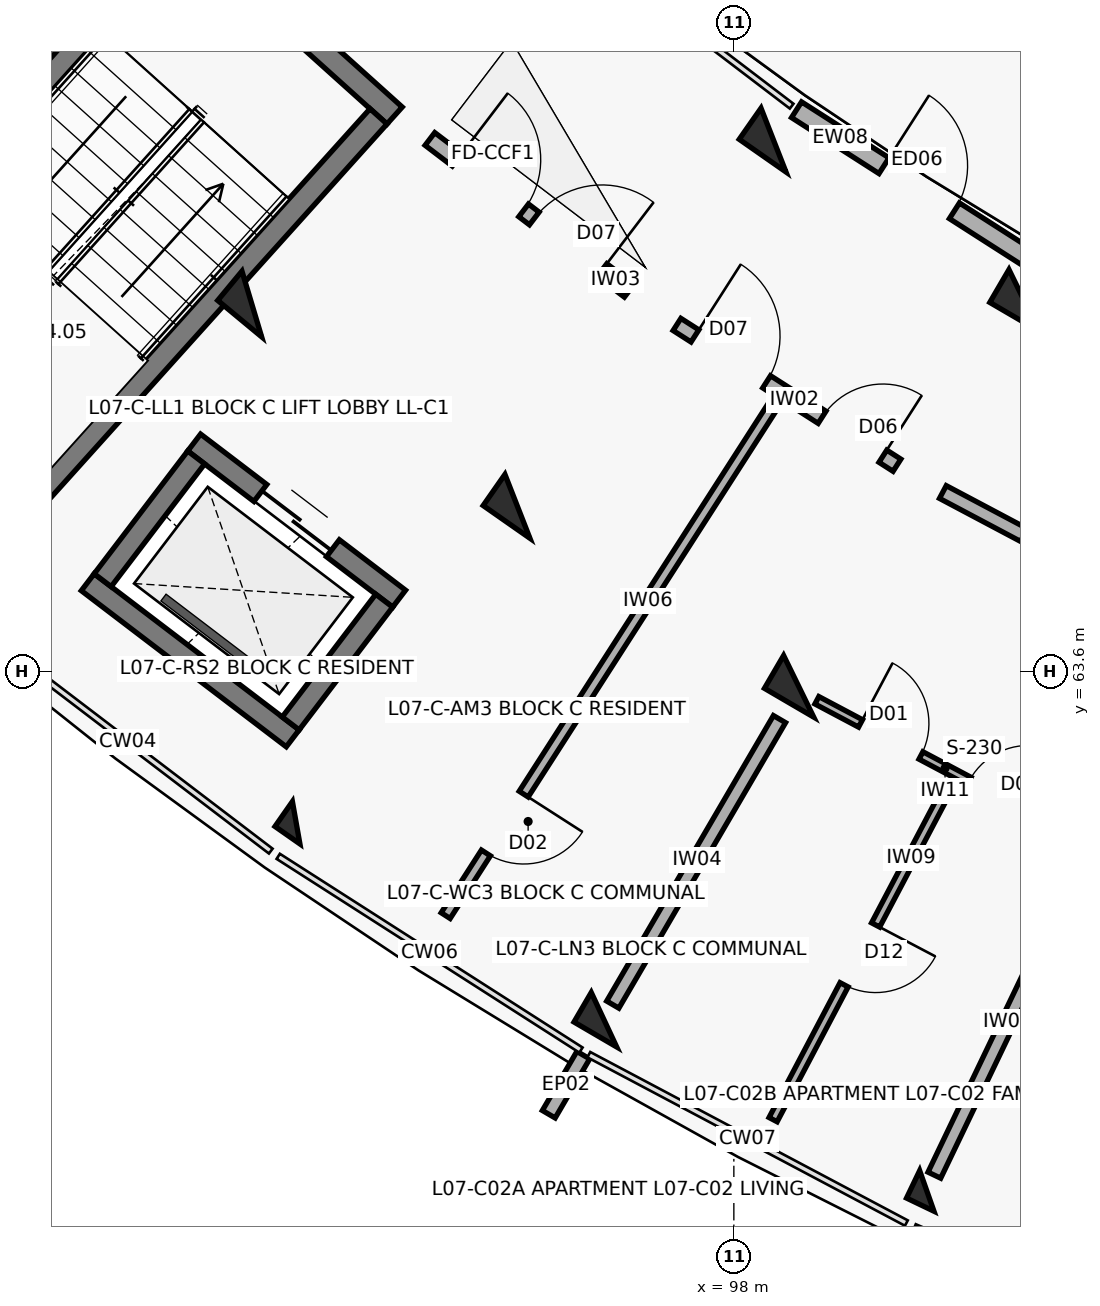
"""IFC4 building model, lengths in metres.
Left out: names, types, materials, properties, quantities, classifications, styles, units other than length and angle.
Written with IfcOpenShell. Run it as: python <this file> out.ifc"""

import sys

from ifc_helpers import new_model, si_unit, direction, frame, frame_2d, origin, origin_2d, place, context, subcontext, project, spatial, rectangle, extrude, element, fill, save


model = new_model("IFC4")
c1 = context("Model", 3, precision=1e-05, world=origin(), true_north=direction((0.0, 1.0)))
c2 = subcontext(c1, "Body", "Model", "MODEL_VIEW")
j1 = project(units=[si_unit("LENGTHUNIT", "METRE"), si_unit("PLANEANGLEUNIT", "RADIAN")], contexts=[c1])
p1 = place(None, origin())
s1 = spatial("IfcSite", under=j1, at=p1, CompositionType="ELEMENT")
p2 = place(p1, origin())
s2 = spatial("IfcBuilding", under=s1, at=p2, CompositionType="ELEMENT")
p3 = place(p2, frame((0.0, 0.0, 23.6)))
s3 = spatial("IfcBuildingStorey", under=s2, at=p3, CompositionType="ELEMENT", Elevation=23.6)
for number, where, z_axis, x_axis in (
    (1, (91.658, 68.43, 0.0), (0.0, 0.0, 1.0), (-0.638, -0.77, 0.0)),
    (2, (98.522, 70.587, 0.0), (0.0, 0.0, 1.0), (-0.573, -0.82, 0.0)),
    (3, (95.152, 65.768, 0.0), (0.0, 0.0, 1.0), (-0.573, -0.82, 0.0)),
):
    element("IfcColumn", number, at=place(p3, frame(where, z_axis=z_axis, x_axis=x_axis)), inside=s3, PredefinedType="COLUMN", context=c2, shape_type="SweptSolid", body=[
        extrude(rectangle(XDim=0.5, YDim=0.75, at=origin_2d()), origin(), (0.0, 0.0, 1.0), 3.1),
    ])
p4 = place(p3, frame((92.241, 61.605, 0.0), z_axis=(0.0, 0.0, 1.0), x_axis=(-0.573004420611, -0.819552276527, 0.0)))
e4 = element("IfcColumn", 4, at=p4, inside=s3, PredefinedType="COLUMN", context=c2, shape_type="SweptSolid", body=[
    extrude(rectangle(XDim=0.4, YDim=0.4, at=origin_2d()), origin(), (0.0, 0.0, 1.0), 3.1),
])
for number, where, z_axis, x_axis in (
    (5, (101.817, 68.478, 0.0), (0.0, 0.0, 1.0), (-0.504, -0.864, 0.0)),
    (6, (98.853, 63.4, 0.0), (0.0, 0.0, 1.0), (-0.504, -0.864, 0.0)),
):
    element("IfcColumn", number, at=place(p3, frame(where, z_axis=z_axis, x_axis=x_axis)), inside=s3, PredefinedType="COLUMN", context=c2, shape_type="SweptSolid", body=[
        extrude(rectangle(XDim=0.5, YDim=0.75, at=origin_2d()), origin(), (0.0, 0.0, 1.0), 3.1),
    ])
p5 = place(p3, frame((96.291, 59.013, 0.0), z_axis=(0.0, 0.0, 1.0), x_axis=(-0.504226211181, -0.863571611366, 0.0)))
e7 = element("IfcColumn", 7, at=p5, inside=s3, PredefinedType="COLUMN", context=c2, shape_type="SweptSolid", body=[
    extrude(rectangle(XDim=0.45, YDim=0.65, at=origin_2d()), origin(), (0.0, 0.0, 1.0), 3.1),
])
p6 = place(p3, frame((100.539, 56.76, 0.0), z_axis=(0.0, 0.0, 1.0), x_axis=(-0.432085748802, -0.901832526405, 0.0)))
e8 = element("IfcColumn", 8, at=p6, inside=s3, PredefinedType="COLUMN", context=c2, shape_type="SweptSolid", body=[
    extrude(rectangle(XDim=0.4, YDim=0.4, at=origin_2d()), origin(), (0.0, 0.0, 1.0), 3.1),
])
p7 = place(p3, frame((98.825, 70.986, 0.0), z_axis=(0.0, 0.0, 1.0), x_axis=(0.84225520265, -0.539079004979, 0.0)))
e9 = element("IfcWall", 9, at=p7, inside=s3, PredefinedType="SOLIDWALL", context=c2, shape_type="SweptSolid", body=[
    extrude(rectangle(XDim=3.832, YDim=0.245, at=frame_2d((1.916, 0.0))), origin(), (0.0, 0.0, 1.0), 2.25),
])
p8 = place(p7, frame((1.366, 0.0, 0.0)))
e10 = element("IfcOpeningElement", 10, at=p8, cuts=e9, PredefinedType="OPENING", context=c2, shape_type="SweptSolid", body=[
    extrude(rectangle(XDim=1.1, YDim=2.15, at=frame_2d((0.55, 1.075))), frame((0.0, 0.133, 0.0), z_axis=(0.0, -1.0, 0.0), x_axis=(1.0, 0.0, 0.0)), (0.0, 0.0, 1.0), 0.265),
])
p9 = place(p3, frame((96.019, 58.547, 0.0), z_axis=(0.0, 0.0, 1.0), x_axis=(-0.504005947934, -0.863700182035, 0.0)))
e11 = element("IfcWall", 11, at=p9, inside=s3, PredefinedType="PARAPET", context=c2, shape_type="SweptSolid", body=[
    extrude(rectangle(XDim=0.9, YDim=0.195, at=frame_2d((0.45, 0.0))), origin(), (0.0, 0.0, 1.0), 2.25),
])
p10 = place(p3, frame((99.001, 74.446, 0.0), z_axis=(0.0, 0.0, 1.0), x_axis=(0.853096916088, -0.521752481317, 0.0)))
e12 = element("IfcWall", 12, at=p10, inside=s3, PredefinedType="PARAPET", context=c2, shape_type="SweptSolid", body=[
    extrude(rectangle(XDim=9.075, YDim=0.18, at=frame_2d((4.538, 0.0))), origin(), (0.0, 0.0, 1.0), 0.25),
])
p11 = place(p3, frame((90.66, 73.499, 0.0), z_axis=(0.0, 0.0, 1.0), x_axis=(0.743375696158, -0.668874109501, 0.0)))
e13 = element("IfcWall", 13, at=p11, inside=s3, PredefinedType="SHEAR", context=c2, shape_type="SweptSolid", body=[
    extrude(rectangle(XDim=3.87, YDim=0.3, at=frame_2d((1.935, 0.0))), origin(), (0.0, 0.0, 1.0), 3.1),
])
p12 = place(p11, frame((1.435, 0.0, 0.0)))
e14 = element("IfcOpeningElement", 14, at=p12, cuts=e13, PredefinedType="OPENING", context=c2, shape_type="SweptSolid", body=[
    extrude(rectangle(XDim=1.0, YDim=2.15, at=frame_2d((0.5, 1.075))), frame((0.0, 0.16, 0.0), z_axis=(0.0, -1.0, 0.0), x_axis=(1.0, 0.0, 0.0)), (0.0, 0.0, 1.0), 0.32),
])
p13 = place(p3, frame((90.671, 73.287, 0.0), z_axis=(0.0, 0.0, 1.0), x_axis=(-0.668885797871, -0.743365179038, 0.0)))
e15 = element("IfcWall", 15, at=p13, inside=s3, PredefinedType="SHEAR", context=c2, shape_type="SweptSolid", body=[
    extrude(rectangle(XDim=7.69, YDim=0.3, at=frame_2d((3.845, 0.0))), origin(), (0.0, 0.0, 1.0), 3.1),
])
p14 = place(p3, frame((93.325, 70.899, 0.0), z_axis=(0.0, 0.0, 1.0), x_axis=(-0.668868253964, -0.743380964808, 0.0)))
e16 = element("IfcWall", 16, at=p14, inside=s3, PredefinedType="SHEAR", context=c2, shape_type="SweptSolid", body=[
    extrude(rectangle(XDim=7.69, YDim=0.3, at=frame_2d((3.845, 0.0))), origin(), (0.0, 0.0, 1.0), 3.1),
])
p15 = place(p3, frame((90.899, 66.607, 0.0), z_axis=(0.0, 0.0, 1.0), x_axis=(0.795439986025, -0.606032365994, 0.0)))
e17 = element("IfcWall", 17, at=p15, inside=s3, PredefinedType="SHEAR", context=c2, shape_type="SweptSolid", body=[
    extrude(rectangle(XDim=3.39, YDim=0.28, at=frame_2d((1.695, 0.0))), origin(), (0.0, 0.0, 1.0), 3.1),
])
p16 = place(p15, frame((1.095, 0.0, 0.0)))
e18 = element("IfcOpeningElement", 18, at=p16, cuts=e17, PredefinedType="OPENING", context=c2, shape_type="SweptSolid", body=[
    extrude(rectangle(XDim=1.2, YDim=2.15, at=frame_2d((0.6, 1.075))), frame((0.0, 0.15, 0.0), z_axis=(0.0, -1.0, 0.0), x_axis=(1.0, 0.0, 0.0)), (0.0, 0.0, 1.0), 0.3),
])
p17 = place(p3, frame((89.5, 64.77, 0.0), z_axis=(0.0, 0.0, 1.0), x_axis=(0.795474703455, -0.605986795371, 0.0)))
e19 = element("IfcWall", 19, at=p17, inside=s3, PredefinedType="SHEAR", context=c2, shape_type="SweptSolid", body=[
    extrude(rectangle(XDim=3.39, YDim=0.28, at=frame_2d((1.695, 0.0))), origin(), (0.0, 0.0, 1.0), 3.1),
])
p18 = place(p3, frame((90.926, 66.411, 0.0), z_axis=(0.0, 0.0, 1.0), x_axis=(-0.605948992168, -0.795503500238, 0.0)))
e20 = element("IfcWall", 20, at=p18, inside=s3, PredefinedType="SHEAR", context=c2, shape_type="SweptSolid", body=[
    extrude(rectangle(XDim=2.03, YDim=0.28, at=frame_2d((1.015, 0.0))), origin(), (0.0, 0.0, 1.0), 3.1),
])
p19 = place(p3, frame((93.4, 64.526, 0.0), z_axis=(0.0, 0.0, 1.0), x_axis=(-0.605891019062, -0.795547656033, 0.0)))
e21 = element("IfcWall", 21, at=p19, inside=s3, PredefinedType="SHEAR", context=c2, shape_type="SweptSolid", body=[
    extrude(rectangle(XDim=2.03, YDim=0.28, at=frame_2d((1.015, 0.0))), origin(), (0.0, 0.0, 1.0), 3.1),
])
p20 = place(p3, frame((94.001, 70.602, 0.0), z_axis=(0.0, 0.0, 1.0), x_axis=(0.795498026433, -0.605956178235, 0.0)))
e22 = element("IfcWall", 22, at=p20, inside=s3, PredefinedType="SOLIDWALL", context=c2, shape_type="SweptSolid", body=[
    extrude(rectangle(XDim=3.296, YDim=0.21, at=frame_2d((1.648, 0.0))), origin(), (0.0, 0.0, 1.0), 2.08),
])
p21 = place(p20, frame((0.45, 0.0, 0.0)))
e23 = element("IfcOpeningElement", 23, at=p21, cuts=e22, PredefinedType="OPENING", context=c2, shape_type="SweptSolid", body=[
    extrude(rectangle(XDim=1.1, YDim=2.15, at=frame_2d((0.55, 1.075))), frame((0.0, 0.115, 0.0), z_axis=(0.0, -1.0, 0.0), x_axis=(1.0, 0.0, 0.0)), (0.0, 0.0, 1.0), 0.23),
])
p22 = place(p20, frame((1.726, 0.0, 0.0)))
e24 = element("IfcOpeningElement", 24, at=p22, cuts=e22, PredefinedType="OPENING", context=c2, shape_type="SweptSolid", body=[
    extrude(rectangle(XDim=1.12, YDim=2.15, at=frame_2d((0.56, 1.075))), frame((0.0, 0.115, 0.0), z_axis=(0.0, -1.0, 0.0), x_axis=(1.0, 0.0, 0.0)), (0.0, 0.0, 1.0), 0.23),
])
p23 = place(p3, frame((97.252, 68.161, 0.0), z_axis=(0.0, 0.0, 1.0), x_axis=(0.842289466461, -0.53902546757, 0.0)))
e25 = element("IfcWall", 25, at=p23, inside=s3, PredefinedType="SOLIDWALL", context=c2, shape_type="SweptSolid", body=[
    extrude(rectangle(XDim=3.436, YDim=0.19, at=frame_2d((1.718, 0.0))), origin(), (0.0, 0.0, 1.0), 2.08),
])
p24 = place(p23, frame((0.28, 0.0, 0.0)))
e26 = element("IfcOpeningElement", 26, at=p24, cuts=e25, PredefinedType="OPENING", context=c2, shape_type="SweptSolid", body=[
    extrude(rectangle(XDim=1.12, YDim=2.15, at=frame_2d((0.56, 1.075))), frame((0.0, 0.105, 0.0), z_axis=(0.0, -1.0, 0.0), x_axis=(1.0, 0.0, 0.0)), (0.0, 0.0, 1.0), 0.21),
])
p25 = place(p23, frame((2.266, 0.0, 0.0)))
e27 = element("IfcOpeningElement", 27, at=p25, cuts=e25, PredefinedType="OPENING", context=c2, shape_type="SweptSolid", body=[
    extrude(rectangle(XDim=0.95, YDim=2.1, at=frame_2d((0.475, 1.05))), frame((0.0, 0.105, 0.0), z_axis=(0.0, -1.0, 0.0), x_axis=(1.0, 0.0, 0.0)), (0.0, 0.0, 1.0), 0.21),
])
p26 = place(p3, frame((98.504, 67.072, 0.0), z_axis=(0.0, 0.0, 1.0), x_axis=(-0.540338452216, -0.841447774408, 0.0)))
e28 = element("IfcWall", 28, at=p26, inside=s3, PredefinedType="PARTITIONING", context=c2, shape_type="SweptSolid", body=[
    extrude(rectangle(XDim=7.95, YDim=0.14, at=frame_2d((3.975, 0.0))), origin(), (0.0, 0.0, 1.0), 2.08),
])
p27 = place(p26, frame((6.05, 0.0, 0.0)))
e29 = element("IfcOpeningElement", 29, at=p27, cuts=e28, PredefinedType="OPENING", context=c2, shape_type="SweptSolid", body=[
    extrude(rectangle(XDim=0.92, YDim=2.1, at=frame_2d((0.46, 1.05))), frame((0.0, 0.08, 0.0), z_axis=(0.0, -1.0, 0.0), x_axis=(1.0, 0.0, 0.0)), (0.0, 0.0, 1.0), 0.16),
])
p28 = place(p3, frame((100.75, 65.956, 0.0), z_axis=(0.0, 0.0, 1.0), x_axis=(0.883440266101, -0.468543803963, 0.0)))
e30 = element("IfcWall", 30, at=p28, inside=s3, PredefinedType="SOLIDWALL", context=c2, shape_type="SweptSolid", body=[
    extrude(rectangle(XDim=3.436, YDim=0.19, at=frame_2d((1.718, 0.0))), origin(), (0.0, 0.0, 1.0), 2.08),
])
p29 = place(p28, frame((1.208, 0.0, 0.0)))
e31 = element("IfcOpeningElement", 31, at=p29, cuts=e30, PredefinedType="OPENING", context=c2, shape_type="SweptSolid", body=[
    extrude(rectangle(XDim=1.02, YDim=2.15, at=frame_2d((0.51, 1.075))), frame((0.0, 0.105, 0.0), z_axis=(0.0, -1.0, 0.0), x_axis=(1.0, 0.0, 0.0)), (0.0, 0.0, 1.0), 0.21),
])
p30 = place(p3, frame((99.093, 63.216, 0.0), z_axis=(0.0, 0.0, 1.0), x_axis=(0.883432667361, -0.468558131121, 0.0)))
e32 = element("IfcWall", 32, at=p30, inside=s3, PredefinedType="PARTITIONING", context=c2, shape_type="SweptSolid", body=[
    extrude(rectangle(XDim=3.797, YDim=0.11, at=frame_2d((1.899, 0.0))), origin(), (0.0, 0.0, 1.0), 2.08),
])
p31 = place(p30, frame((0.65, 0.0, 0.0)))
e33 = element("IfcOpeningElement", 33, at=p31, cuts=e32, PredefinedType="OPENING", context=c2, shape_type="SweptSolid", body=[
    extrude(rectangle(XDim=0.9, YDim=2.1, at=frame_2d((0.45, 1.05))), frame((0.0, 0.065, 0.0), z_axis=(0.0, -1.0, 0.0), x_axis=(1.0, 0.0, 0.0)), (0.0, 0.0, 1.0), 0.13),
])
p32 = place(p30, frame((2.267, 0.0, 0.0)))
e34 = element("IfcOpeningElement", 34, at=p32, cuts=e32, PredefinedType="OPENING", context=c2, shape_type="SweptSolid", body=[
    extrude(rectangle(XDim=0.88, YDim=2.1, at=frame_2d((0.44, 1.05))), frame((0.0, 0.065, 0.0), z_axis=(0.0, -1.0, 0.0), x_axis=(1.0, 0.0, 0.0)), (0.0, 0.0, 1.0), 0.13),
])
p33 = place(p3, frame((100.799, 62.034, 0.0), z_axis=(0.0, 0.0, 1.0), x_axis=(-0.465869641373, -0.884853364828, 0.0)))
e35 = element("IfcWall", 35, at=p33, inside=s3, PredefinedType="PARTITIONING", context=c2, shape_type="SweptSolid", body=[
    extrude(rectangle(XDim=4.9, YDim=0.12, at=frame_2d((2.45, 0.0))), origin(), (0.0, 0.0, 1.0), 2.08),
])
p34 = place(p33, frame((2.005, 0.0, 0.0)))
e36 = element("IfcOpeningElement", 36, at=p34, cuts=e35, PredefinedType="OPENING", context=c2, shape_type="SweptSolid", body=[
    extrude(rectangle(XDim=0.89, YDim=2.1, at=frame_2d((0.445, 1.05))), frame((0.0, 0.07, 0.0), z_axis=(0.0, -1.0, 0.0), x_axis=(1.0, 0.0, 0.0)), (0.0, 0.0, 1.0), 0.14),
])
p35 = place(p3, frame((98.601, 62.968, 0.0), z_axis=(0.0, 0.0, 1.0), x_axis=(-0.504216452091, -0.863577309475, 0.0)))
e37 = element("IfcWall", 37, at=p35, inside=s3, PredefinedType="SOLIDWALL", context=c2, shape_type="SweptSolid", body=[
    extrude(rectangle(XDim=4.35, YDim=0.185, at=frame_2d((2.175, 0.0))), origin(), (0.0, 0.0, 1.0), 2.08),
])
p36 = place(p3, frame((102.518, 60.89, 0.0), z_axis=(0.0, 0.0, 1.0), x_axis=(-0.432108769108, -0.901821496561, 0.0)))
e38 = element("IfcWall", 38, at=p36, inside=s3, PredefinedType="SOLIDWALL", context=c2, shape_type="SweptSolid", body=[
    extrude(rectangle(XDim=4.35, YDim=0.185, at=frame_2d((2.175, 0.0))), origin(), (0.0, 0.0, 1.0), 2.08),
])
p37 = place(p8, origin())
e39 = element("IfcDoor", 39, at=p37, inside=s3, OperationType="SINGLE_SWING_LEFT", PredefinedType="DOOR", context=c2, shape_type="SweptSolid", body=[
    extrude(rectangle(XDim=1.1, YDim=2.15, at=frame_2d((0.55, 1.075))), frame((0.0, 0.025, 0.0), z_axis=(0.0, -1.0, 0.0), x_axis=(1.0, 0.0, 0.0)), (0.0, 0.0, 1.0), 0.05),
])
fill(e10, e39)
p38 = place(p16, origin())
e40 = element("IfcDoor", 40, at=p38, inside=s3, OperationType="DOUBLE_DOOR_SLIDING", PredefinedType="DOOR", context=c2, shape_type="SweptSolid", body=[
    extrude(rectangle(XDim=1.2, YDim=2.15, at=frame_2d((0.6, 1.075))), frame((0.0, 0.025, 0.0), z_axis=(0.0, -1.0, 0.0), x_axis=(1.0, 0.0, 0.0)), (0.0, 0.0, 1.0), 0.05),
])
fill(e18, e40)
p39 = place(p21, origin())
e41 = element("IfcDoor", 41, at=p39, inside=s3, OperationType="SINGLE_SWING_LEFT", PredefinedType="DOOR", context=c2, shape_type="SweptSolid", body=[
    extrude(rectangle(XDim=1.1, YDim=2.15, at=frame_2d((0.55, 1.075))), frame((0.0, 0.025, 0.0), z_axis=(0.0, -1.0, 0.0), x_axis=(1.0, 0.0, 0.0)), (0.0, 0.0, 1.0), 0.05),
])
fill(e23, e41)
p40 = place(p22, origin())
e42 = element("IfcDoor", 42, at=p40, inside=s3, OperationType="SINGLE_SWING_RIGHT", PredefinedType="DOOR", context=c2, shape_type="SweptSolid", body=[
    extrude(rectangle(XDim=1.12, YDim=2.15, at=frame_2d((0.56, 1.075))), frame((0.0, 0.025, 0.0), z_axis=(0.0, -1.0, 0.0), x_axis=(1.0, 0.0, 0.0)), (0.0, 0.0, 1.0), 0.05),
])
fill(e24, e42)
p41 = place(p24, origin())
e43 = element("IfcDoor", 43, at=p41, inside=s3, OperationType="SINGLE_SWING_LEFT", PredefinedType="DOOR", context=c2, shape_type="SweptSolid", body=[
    extrude(rectangle(XDim=1.12, YDim=2.15, at=frame_2d((0.56, 1.075))), frame((0.0, 0.025, 0.0), z_axis=(0.0, -1.0, 0.0), x_axis=(1.0, 0.0, 0.0)), (0.0, 0.0, 1.0), 0.05),
])
fill(e26, e43)
p42 = place(p25, origin())
e44 = element("IfcDoor", 44, at=p42, inside=s3, OperationType="SINGLE_SWING_RIGHT", PredefinedType="DOOR", context=c2, shape_type="SweptSolid", body=[
    extrude(rectangle(XDim=0.95, YDim=2.1, at=frame_2d((0.475, 1.05))), frame((0.0, 0.025, 0.0), z_axis=(0.0, -1.0, 0.0), x_axis=(1.0, 0.0, 0.0)), (0.0, 0.0, 1.0), 0.05),
])
fill(e27, e44)
p43 = place(p27, origin())
e45 = element("IfcDoor", 45, at=p43, inside=s3, OperationType="SINGLE_SWING_LEFT", PredefinedType="DOOR", context=c2, shape_type="SweptSolid", body=[
    extrude(rectangle(XDim=0.92, YDim=2.1, at=frame_2d((0.46, 1.05))), frame((0.0, 0.025, 0.0), z_axis=(0.0, -1.0, 0.0), x_axis=(1.0, 0.0, 0.0)), (0.0, 0.0, 1.0), 0.05),
])
fill(e29, e45)
p44 = place(p31, origin())
e46 = element("IfcDoor", 46, at=p44, inside=s3, OperationType="SINGLE_SWING_LEFT", PredefinedType="DOOR", context=c2, shape_type="SweptSolid", body=[
    extrude(rectangle(XDim=0.9, YDim=2.1, at=frame_2d((0.45, 1.05))), frame((0.0, 0.025, 0.0), z_axis=(0.0, -1.0, 0.0), x_axis=(1.0, 0.0, 0.0)), (0.0, 0.0, 1.0), 0.05),
])
fill(e33, e46)
p45 = place(p32, origin())
e47 = element("IfcDoor", 47, at=p45, inside=s3, OperationType="SINGLE_SWING_RIGHT", PredefinedType="DOOR", context=c2, shape_type="SweptSolid", body=[
    extrude(rectangle(XDim=0.88, YDim=2.1, at=frame_2d((0.44, 1.05))), frame((0.0, 0.025, 0.0), z_axis=(0.0, -1.0, 0.0), x_axis=(1.0, 0.0, 0.0)), (0.0, 0.0, 1.0), 0.05),
])
fill(e34, e47)
p46 = place(p34, origin())
e48 = element("IfcDoor", 48, at=p46, inside=s3, OperationType="SINGLE_SWING_LEFT", PredefinedType="DOOR", context=c2, shape_type="SweptSolid", body=[
    extrude(rectangle(XDim=0.89, YDim=2.1, at=frame_2d((0.445, 1.05))), frame((0.0, 0.025, 0.0), z_axis=(0.0, -1.0, 0.0), x_axis=(1.0, 0.0, 0.0)), (0.0, 0.0, 1.0), 0.05),
])
fill(e36, e48)
save(model, sys.argv[1])
